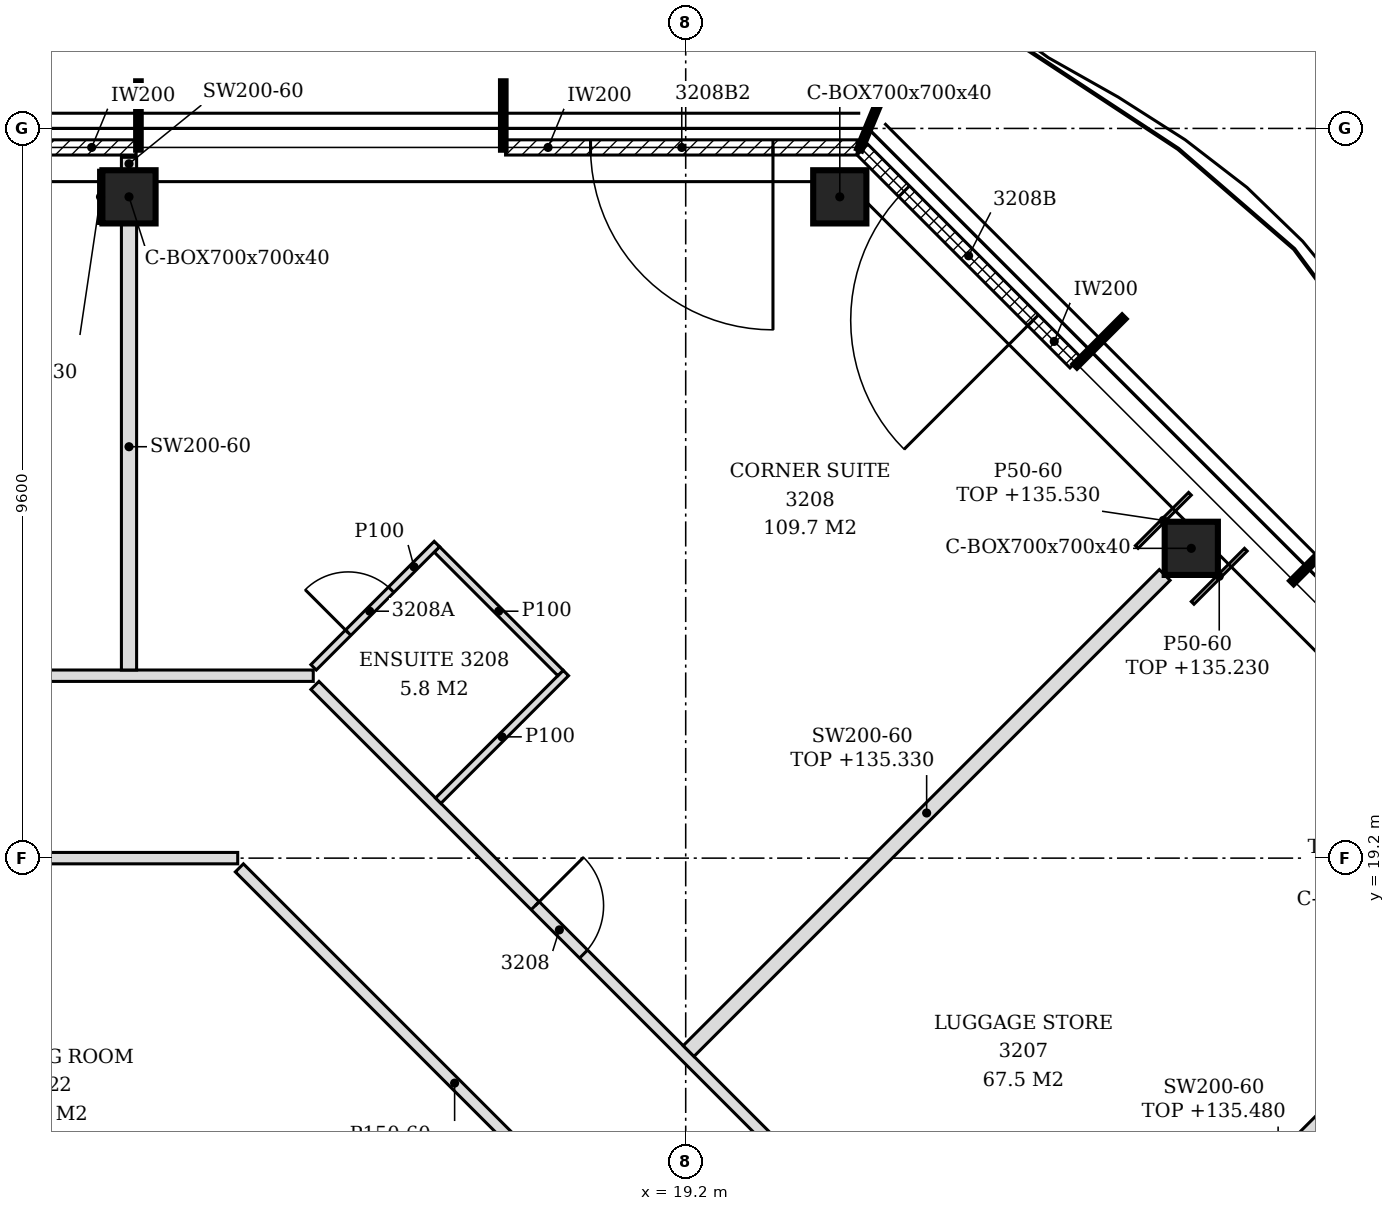
"""IFC4 building model, lengths in metres.
Left out: names, types, materials, properties, quantities, classifications, styles, units other than length and angle.
Written with IfcOpenShell. Run it as: python <this file> out.ifc"""

import sys

from ifc_helpers import new_model, si_unit, direction, frame, frame_2d, origin, origin_2d, place, context, subcontext, project, spatial, polyline, rectangle, hollow_rectangle, outline, extrude, element, fill, save


model = new_model("IFC4")
c1 = context("Model", 3, precision=1e-05, world=origin(), true_north=direction((0.0, 1.0)))
c2 = subcontext(c1, "Body", "Model", "MODEL_VIEW")
j1 = project(units=[si_unit("LENGTHUNIT", "METRE"), si_unit("PLANEANGLEUNIT", "RADIAN")], contexts=[c1])
p1 = place(None, origin())
s1 = spatial("IfcSite", under=j1, at=p1, CompositionType="ELEMENT")
p2 = place(p1, origin())
s2 = spatial("IfcBuilding", under=s1, at=p2, CompositionType="ELEMENT")
p3 = place(p2, frame((0.0, 0.0, 132.6)))
s3 = spatial("IfcBuildingStorey", under=s2, at=p3, CompositionType="ELEMENT", Elevation=132.6)
for number, where, z_axis, x_axis in (
    (1, (25.852, 23.276, -0.15), (0.0, 0.0, 1.0), (1.0, 0.0, 0.0)),
    (2, (21.227, 27.9, -0.15), (0.0, 0.0, 1.0), (1.0, 0.0, 0.0)),
    (3, (11.876, 27.9, -0.15), (0.0, 0.0, 1.0), (1.0, 0.0, 0.0)),
):
    element("IfcColumn", number, at=place(p3, frame(where, z_axis=z_axis, x_axis=x_axis)), inside=s3, PredefinedType="COLUMN", context=c2, shape_type="SweptSolid", body=[
        extrude(hollow_rectangle(XDim=0.7, YDim=0.7, WallThickness=0.04, at=origin_2d()), origin(), (0.0, 0.0, 1.0), 3.6),
    ])
p4 = place(p3, frame((24.326, 25.72, 0.0), z_axis=(0.0, 0.0, 1.0), x_axis=(-0.707106781187, 0.707106781187, 0.0)))
e4 = element("IfcWall", 4, at=p4, inside=s3, PredefinedType="NOTDEFINED", context=c2, shape_type="SweptSolid", body=[
    extrude(rectangle(XDim=3.962, YDim=0.2, at=frame_2d((1.981, 0.0))), origin(), (0.0, 0.0, 1.0), 3.45),
])
p5 = place(p4, frame((0.786, 0.0, 0.0)))
e5 = element("IfcOpeningElement", 5, at=p5, cuts=e4, PredefinedType="OPENING", context=c2, shape_type="SweptSolid", body=[
    extrude(rectangle(XDim=2.4, YDim=2.4, at=frame_2d((1.2, 1.2))), frame((0.0, 0.11, 0.0), z_axis=(0.0, -1.0, 0.0), x_axis=(1.0, 0.0, 0.0)), (0.0, 0.0, 1.0), 0.22),
])
p6 = place(p3, frame((21.457, 28.55, 0.0), z_axis=(0.0, 0.0, 1.0), x_axis=(-1.0, 0.0, 0.0)))
e6 = element("IfcWall", 6, at=p6, inside=s3, PredefinedType="NOTDEFINED", context=c2, shape_type="SweptSolid", body=[
    extrude(rectangle(XDim=4.626, YDim=0.2, at=frame_2d((2.313, 0.0))), origin(), (0.0, 0.0, 1.0), 3.45),
])
p7 = place(p6, frame((1.108, 0.0, 0.0)))
e7 = element("IfcOpeningElement", 7, at=p7, cuts=e6, PredefinedType="OPENING", context=c2, shape_type="SweptSolid", body=[
    extrude(rectangle(XDim=2.4, YDim=2.4, at=frame_2d((1.2, 1.2))), frame((0.0, 0.11, 0.0), z_axis=(0.0, -1.0, 0.0), x_axis=(1.0, 0.0, 0.0)), (0.0, 0.0, 1.0), 0.22),
])
p8 = place(p3, frame((11.97, 28.55, 0.0), z_axis=(0.0, 0.0, 1.0), x_axis=(-1.0, 0.0, 0.0)))
e8 = element("IfcWall", 8, at=p8, inside=s3, PredefinedType="NOTDEFINED", context=c2, shape_type="SweptSolid", body=[
    extrude(rectangle(XDim=4.74, YDim=0.2, at=frame_2d((2.37, 0.0))), origin(), (0.0, 0.0, 1.0), 3.45),
])
p9 = place(p8, frame((1.17, 0.0, 0.0)))
e9 = element("IfcOpeningElement", 9, at=p9, cuts=e8, PredefinedType="OPENING", context=c2, shape_type="SweptSolid", body=[
    extrude(rectangle(XDim=2.4, YDim=2.4, at=frame_2d((1.2, 1.2))), frame((0.0, 0.11, 0.0), z_axis=(0.0, -1.0, 0.0), x_axis=(1.0, 0.0, 0.0)), (0.0, 0.0, 1.0), 0.22),
])
p10 = place(p3, frame((31.072, 4.722, 0.0), z_axis=(0.0, 0.0, 1.0), x_axis=(-0.707106781187, 0.707106781187, 0.0)))
e10 = element("IfcWall", 10, at=p10, inside=s3, PredefinedType="PARTITIONING", context=c2, shape_type="SweptSolid", body=[
    extrude(rectangle(XDim=23.688, YDim=0.15, at=frame_2d((11.844, 0.0))), origin(), (0.0, 0.0, 1.0), 2.73),
])
p11 = place(p10, frame((8.135, 0.0, 0.0)))
e11 = element("IfcOpeningElement", 11, at=p11, cuts=e10, PredefinedType="OPENING", context=c2, shape_type="SweptSolid", body=[
    extrude(rectangle(XDim=0.9, YDim=2.1, at=frame_2d((0.45, 1.05))), frame((0.0, 0.085, 0.0), z_axis=(0.0, -1.0, 0.0), x_axis=(1.0, 0.0, 0.0)), (0.0, 0.0, 1.0), 0.17),
])
p12 = place(p10, frame((13.091, 0.0, 0.0)))
e12 = element("IfcOpeningElement", 12, at=p12, cuts=e10, PredefinedType="OPENING", context=c2, shape_type="SweptSolid", body=[
    extrude(rectangle(XDim=0.9, YDim=2.1, at=frame_2d((0.45, 1.05))), frame((0.0, 0.085, 0.0), z_axis=(0.0, -1.0, 0.0), x_axis=(1.0, 0.0, 0.0)), (0.0, 0.0, 1.0), 0.17),
])
p13 = place(p10, frame((18.69, 0.0, 0.0)))
e13 = element("IfcOpeningElement", 13, at=p13, cuts=e10, PredefinedType="OPENING", context=c2, shape_type="SweptSolid", body=[
    extrude(rectangle(XDim=0.9, YDim=2.1, at=frame_2d((0.45, 1.05))), frame((0.0, 0.085, 0.0), z_axis=(0.0, -1.0, 0.0), x_axis=(1.0, 0.0, 0.0)), (0.0, 0.0, 1.0), 0.17),
])
p14 = place(p3, frame((23.862, 12.038, 0.0), z_axis=(0.0, 0.0, 1.0), x_axis=(0.707106781187, 0.707106781187, 0.0)))
e14 = element("IfcWall", 14, at=p14, inside=s3, PredefinedType="PARTITIONING", context=c2, shape_type="SweptSolid", body=[
    extrude(rectangle(XDim=8.858, YDim=0.2, at=frame_2d((4.429, 0.0))), origin(), (0.0, 0.0, 1.0), 2.88),
])
p15 = place(p3, frame((18.991, 13.408, 0.0), z_axis=(0.0, 0.0, 1.0), x_axis=(-0.707106781187, 0.707106781187, 0.0)))
e15 = element("IfcWall", 15, at=p15, inside=s3, PredefinedType="PARTITIONING", context=c2, shape_type="SweptSolid", body=[
    extrude(rectangle(XDim=8.01, YDim=0.15, at=frame_2d((4.005, 0.0))), origin(), (0.0, 0.0, 1.0), 2.88),
])
p16 = place(p3, frame((19.238, 16.662, 0.0), z_axis=(0.0, 0.0, 1.0), x_axis=(0.707120561855, 0.707093000249, 0.0)))
e16 = element("IfcWall", 16, at=p16, inside=s3, PredefinedType="PARTITIONING", context=c2, shape_type="SweptSolid", body=[
    extrude(rectangle(XDim=8.858, YDim=0.2, at=frame_2d((4.429, 0.0))), origin(), (0.0, 0.0, 1.0), 2.73),
])
p17 = place(p3, frame((2.325, 19.2, 0.0), z_axis=(0.0, 0.0, 1.0), x_axis=(1.0, 0.0, 0.0)))
e17 = element("IfcWall", 17, at=p17, inside=s3, PredefinedType="PARTITIONING", context=c2, shape_type="SweptSolid", body=[
    extrude(outline(polyline([(0.0, 0.0), (10.981, 0.0), (10.981, 2.88), (5.025, 2.88), (5.023, 2.73), (4.725, 2.73), (4.723, 2.88), (0.0, 2.88), (0.0, 0.0)])), frame((0.0, 0.075, 0.0), z_axis=(0.0, -1.0, 0.0), x_axis=(1.0, 0.0, 0.0)), (0.0, 0.0, 1.0), 0.15),
])
p18 = place(p3, frame((15.944, 19.956, 0.0), z_axis=(0.0, 0.0, 1.0), x_axis=(0.707106781187, 0.707106781187, 0.0)))
e18 = element("IfcWall", 18, at=p18, inside=s3, PredefinedType="PARTITIONING", context=c2, shape_type="SweptSolid", body=[
    extrude(rectangle(XDim=2.375, YDim=0.1, at=frame_2d((1.188, 0.0))), origin(), (0.0, 0.0, 1.0), 3.45),
])
p19 = place(p3, frame((0.1, 21.6, 0.0), z_axis=(0.0, 0.0, 1.0), x_axis=(1.0, 0.0, 0.0)))
e19 = element("IfcWall", 19, at=p19, inside=s3, PredefinedType="PARTITIONING", context=c2, shape_type="SweptSolid", body=[
    extrude(outline(polyline([(0.0, 0.0), (14.2, 0.0), (14.2, 3.45), (7.25, 3.45), (7.248, 2.73), (6.95, 2.73), (6.948, 3.45), (0.0, 3.45), (0.0, 0.0)])), frame((0.0, 0.075, 0.0), z_axis=(0.0, -1.0, 0.0), x_axis=(1.0, 0.0, 0.0)), (0.0, 0.0, 1.0), 0.15),
])
p20 = place(p19, frame((6.65, 0.0, 0.0)))
e20 = element("IfcOpeningElement", 20, at=p20, cuts=e19, PredefinedType="OPENING", context=c2, shape_type="SweptSolid", body=[
    extrude(rectangle(XDim=0.9, YDim=2.1, at=frame_2d((0.45, 1.05))), frame((0.0, 0.085, 0.0), z_axis=(0.0, -1.0, 0.0), x_axis=(1.0, 0.0, 0.0)), (0.0, 0.0, 1.0), 0.17),
])
p21 = place(p3, frame((17.552, 21.635, 0.0), z_axis=(0.0, 0.0, 1.0), x_axis=(-0.707053697085, 0.707159861304, 0.0)))
e21 = element("IfcWall", 21, at=p21, inside=s3, PredefinedType="PARTITIONING", context=c2, shape_type="SweptSolid", body=[
    extrude(rectangle(XDim=2.3, YDim=0.1, at=frame_2d((1.15, 0.0))), origin(), (0.0, 0.0, 1.0), 3.45),
])
p22 = place(p3, frame((11.876, 21.675, 0.0), z_axis=(0.0, 0.0, 1.0), x_axis=(0.0, 1.0, 0.0)))
e22 = element("IfcWall", 22, at=p22, inside=s3, PredefinedType="PARTITIONING", context=c2, shape_type="SweptSolid", body=[
    extrude(outline(polyline([(0.0, 0.0), (5.875, 0.0), (5.875, 3.45), (2.43, 3.45), (2.428, 2.88), (2.22, 2.88), (2.218, 3.45), (0.0, 3.45), (0.0, 0.0)])), frame((0.0, 0.1, 0.0), z_axis=(0.0, -1.0, 0.0), x_axis=(1.0, 0.0, 0.0)), (0.0, 0.0, 1.0), 0.2),
])
p23 = place(p3, frame((14.304, 21.71, 0.0), z_axis=(0.0, 0.0, 1.0), x_axis=(0.707106781187, 0.707106781187, 0.0)))
e23 = element("IfcWall", 23, at=p23, inside=s3, PredefinedType="PARTITIONING", context=c2, shape_type="SweptSolid", body=[
    extrude(rectangle(XDim=2.294, YDim=0.1, at=frame_2d((1.147, 0.0))), origin(), (0.0, 0.0, 1.0), 3.45),
])
p24 = place(p23, frame((0.644, 0.0, 0.0)))
e24 = element("IfcOpeningElement", 24, at=p24, cuts=e23, PredefinedType="OPENING", context=c2, shape_type="SweptSolid", body=[
    extrude(rectangle(XDim=0.8, YDim=2.1, at=frame_2d((0.4, 1.05))), frame((0.0, 0.06, 0.0), z_axis=(0.0, -1.0, 0.0), x_axis=(1.0, 0.0, 0.0)), (0.0, 0.0, 1.0), 0.12),
])
p25 = place(p3, frame((11.876, 28.25, 0.0), z_axis=(0.0, 0.0, 1.0), x_axis=(0.0, 1.0, 0.0)))
e25 = element("IfcWall", 25, at=p25, inside=s3, PredefinedType="PARTITIONING", context=c2, shape_type="SweptSolid", body=[
    extrude(rectangle(XDim=0.17, YDim=0.2, at=frame_2d((0.085, 0.0))), origin(), (0.0, 0.0, 1.0), 3.45),
])
p26 = place(p3, frame((25.134, 23.293, 0.0), z_axis=(0.0, 0.0, 1.0), x_axis=(0.707106781187, 0.707106781187, 0.0)))
e26 = element("IfcWall", 26, at=p26, inside=s3, PredefinedType="PARTITIONING", context=c2, shape_type="SweptSolid", body=[
    extrude(rectangle(XDim=0.99, YDim=0.05, at=frame_2d((0.495, 0.0))), origin(), (0.0, 0.0, 1.0), 2.93),
])
p27 = place(p3, frame((25.869, 22.558, 0.0), z_axis=(0.0, 0.0, 1.0), x_axis=(0.707106781187, 0.707106781187, 0.0)))
e27 = element("IfcWall", 27, at=p27, inside=s3, PredefinedType="PARTITIONING", context=c2, shape_type="SweptSolid", body=[
    extrude(rectangle(XDim=0.99, YDim=0.05, at=frame_2d((0.495, 0.0))), origin(), (0.0, 0.0, 1.0), 2.63),
])
p28 = place(p3, frame((11.501, 27.55, 0.0), z_axis=(0.0, 0.0, 1.0), x_axis=(0.0, 1.0, 0.0)))
e28 = element("IfcWall", 28, at=p28, inside=s3, PredefinedType="PARTITIONING", context=c2, shape_type="SweptSolid", body=[
    extrude(rectangle(XDim=0.7, YDim=0.05, at=frame_2d((0.35, 0.0))), origin(), (0.0, 0.0, 1.0), 2.93),
])
p29 = place(p5, origin())
e29 = element("IfcDoor", 29, at=p29, inside=s3, OperationType="SINGLE_SWING_LEFT", PredefinedType="DOOR", context=c2, shape_type="SweptSolid", body=[
    extrude(rectangle(XDim=2.4, YDim=2.4, at=frame_2d((1.2, 1.2))), frame((0.0, 0.025, 0.0), z_axis=(0.0, -1.0, 0.0), x_axis=(1.0, 0.0, 0.0)), (0.0, 0.0, 1.0), 0.05),
])
fill(e5, e29)
p30 = place(p7, origin())
e30 = element("IfcDoor", 30, at=p30, inside=s3, OperationType="SINGLE_SWING_LEFT", PredefinedType="DOOR", context=c2, shape_type="SweptSolid", body=[
    extrude(rectangle(XDim=2.4, YDim=2.4, at=frame_2d((1.2, 1.2))), frame((0.0, 0.025, 0.0), z_axis=(0.0, -1.0, 0.0), x_axis=(1.0, 0.0, 0.0)), (0.0, 0.0, 1.0), 0.05),
])
fill(e7, e30)
p31 = place(p13, frame((0.9, 0.0, 0.0), z_axis=(0.0, 0.0, 1.0), x_axis=(-1.0, 0.0, 0.0)))
e31 = element("IfcDoor", 31, at=p31, inside=s3, OperationType="SINGLE_SWING_LEFT", PredefinedType="DOOR", context=c2, shape_type="SweptSolid", body=[
    extrude(rectangle(XDim=0.9, YDim=2.1, at=frame_2d((0.45, 1.05))), frame((0.0, 0.025, 0.0), z_axis=(0.0, -1.0, 0.0), x_axis=(1.0, 0.0, 0.0)), (0.0, 0.0, 1.0), 0.05),
])
fill(e13, e31)
p32 = place(p24, origin())
e32 = element("IfcDoor", 32, at=p32, inside=s3, OperationType="SINGLE_SWING_LEFT", PredefinedType="DOOR", context=c2, shape_type="SweptSolid", body=[
    extrude(rectangle(XDim=0.8, YDim=2.1, at=frame_2d((0.4, 1.05))), frame((0.0, 0.025, 0.0), z_axis=(0.0, -1.0, 0.0), x_axis=(1.0, 0.0, 0.0)), (0.0, 0.0, 1.0), 0.05),
])
fill(e24, e32)
save(model, sys.argv[1])
